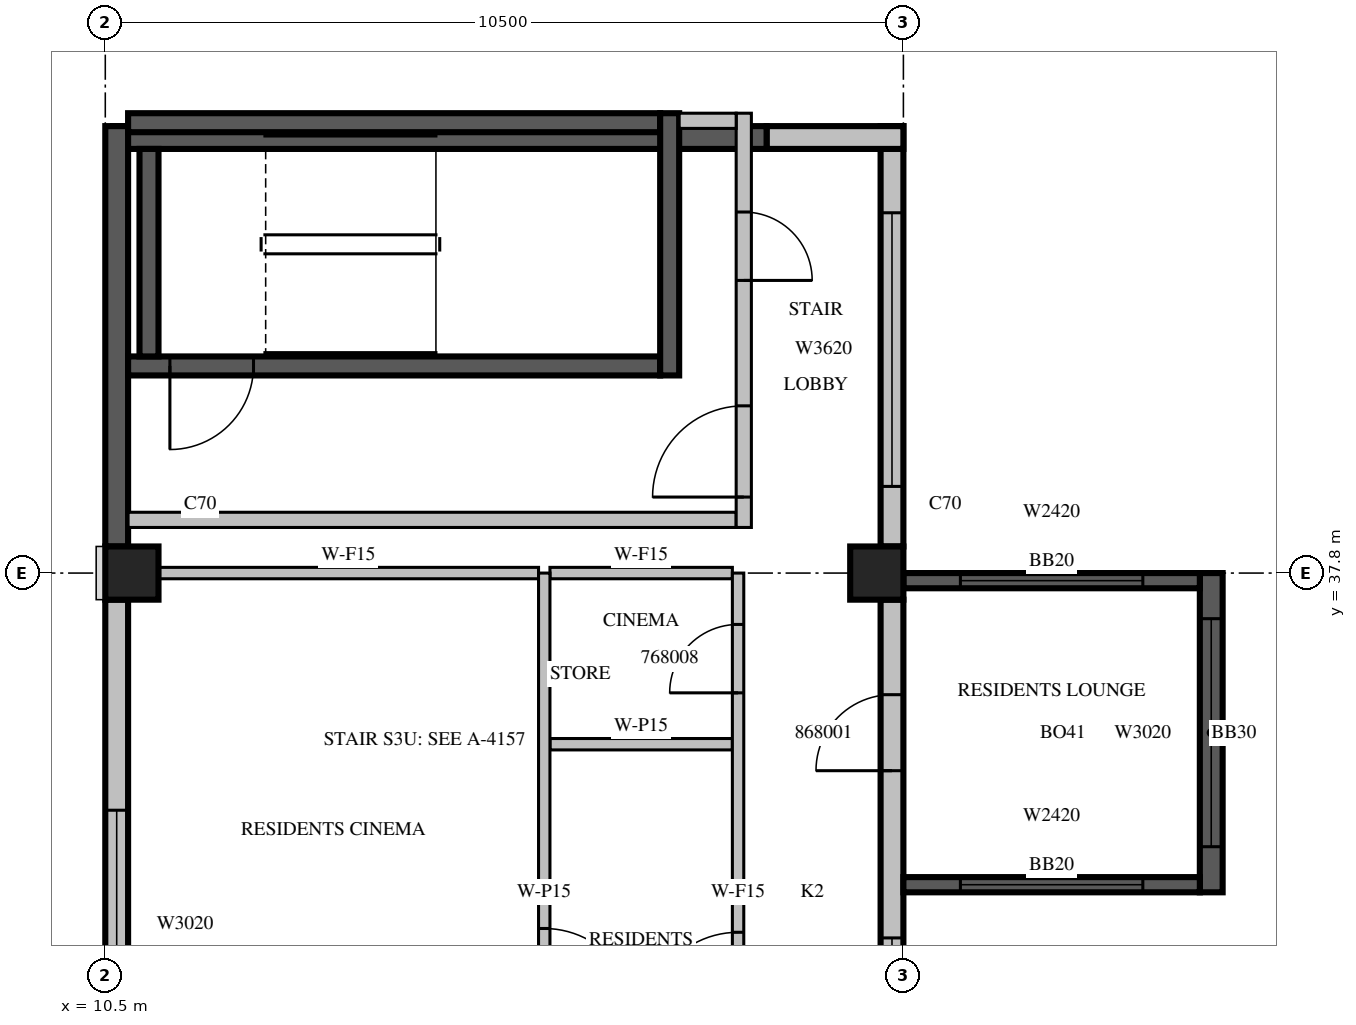
"""IFC4 building model, lengths in metres.
Left out: names, types, materials, properties, quantities, classifications, styles, units other than length and angle.
Written with IfcOpenShell. Run it as: python <this file> out.ifc"""

import sys

from ifc_helpers import new_model, si_unit, direction, frame, frame_2d, origin, origin_2d, place, context, subcontext, project, spatial, rectangle, extrude, source, transform, mapped, element, fill, save


model = new_model("IFC4")
c1 = context("Model", 3, precision=1e-05, world=origin(), true_north=direction((0.0, 1.0)))
c2 = subcontext(c1, "Body", "Model", "MODEL_VIEW")
j1 = project(units=[si_unit("LENGTHUNIT", "METRE"), si_unit("PLANEANGLEUNIT", "RADIAN")], contexts=[c1])
p1 = place(None, origin())
s1 = spatial("IfcSite", under=j1, at=p1, CompositionType="ELEMENT")
p2 = place(p1, origin())
s2 = spatial("IfcBuilding", under=s1, at=p2, CompositionType="ELEMENT")
p3 = place(p2, frame((0.0, 0.0, 298.5)))
s3 = spatial("IfcBuildingStorey", under=s2, at=p3, CompositionType="ELEMENT", Elevation=298.5)
m1 = source(origin(), c2, "Body", "SweptSolid", [
    extrude(rectangle(XDim=0.7, YDim=0.7, at=origin_2d()), origin(), (0.0, 0.0, 1.0), 3.5),
])
for number, where, z_axis, x_axis in (
    (1, (10.85, 37.8, 0.0), (0.0, 0.0, 1.0), (1.0, 0.0, 0.0)),
    (2, (20.65, 37.8, 0.0), (0.0, 0.0, 1.0), (1.0, 0.0, 0.0)),
):
    element("IfcColumn", number, at=place(p3, frame(where, z_axis=z_axis, x_axis=x_axis)), inside=s3, PredefinedType="COLUMN", context=c2, shape_type="MappedRepresentation", body=[
        mapped(m1, transform((0.0, 0.0, 0.0), scale=1.0)),
    ])
m2 = source(origin(), c2, "Body", "SweptSolid", [
    extrude(rectangle(XDim=7.7, YDim=0.3, at=frame_2d((3.85, 0.0))), origin(), (0.0, 0.0, 1.0), 3.1),
])
p4 = place(p3, frame((20.85, 29.75, 0.0), z_axis=(0.0, 0.0, 1.0), x_axis=(0.0, 1.0, 0.0)))
e3 = element("IfcWall", 3, at=p4, inside=s3, PredefinedType="STANDARD", context=c2, shape_type="MappedRepresentation", body=[
    mapped(m2, transform((0.0, 0.0, 0.0), scale=1.0)),
])
m3 = source(origin(), c2, "Body", "SweptSolid", [
    extrude(rectangle(XDim=3.0, YDim=2.0, at=frame_2d((1.5, 1.0))), frame((0.0, 0.16, 0.0), z_axis=(0.0, -1.0, 0.0), x_axis=(1.0, 0.0, 0.0)), (0.0, 0.0, 1.0), 0.32),
])
p5 = place(p4, frame((0.25, 0.0, 0.6)))
e4 = element("IfcOpeningElement", 4, at=p5, cuts=e3, PredefinedType="OPENING", context=c2, shape_type="MappedRepresentation", body=[
    mapped(m3, transform((0.0, 0.0, 0.0), scale=1.0)),
])
m4 = source(origin(), c2, "Body", "SweptSolid", [
    extrude(rectangle(XDim=1.0, YDim=2.1, at=frame_2d((0.5, 1.05))), frame((0.0, 0.16, 0.0), z_axis=(0.0, -1.0, 0.0), x_axis=(1.0, 0.0, 0.0)), (0.0, 0.0, 1.0), 0.32),
])
p6 = place(p4, frame((5.45, 0.0, 0.0)))
e5 = element("IfcOpeningElement", 5, at=p6, cuts=e3, PredefinedType="OPENING", context=c2, shape_type="MappedRepresentation", body=[
    mapped(m4, transform((0.0, 0.0, 0.0), scale=1.0)),
])
m5 = source(origin(), c2, "Body", "SweptSolid", [
    extrude(rectangle(XDim=5.53, YDim=0.3, at=frame_2d((2.765, 0.0))), origin(), (0.0, 0.0, 1.0), 3.1),
])
p7 = place(p3, frame((20.85, 38.15, 0.0), z_axis=(0.0, 0.0, 1.0), x_axis=(0.0, 1.0, 0.0)))
e6 = element("IfcWall", 6, at=p7, inside=s3, PredefinedType="STANDARD", context=c2, shape_type="MappedRepresentation", body=[
    mapped(m5, transform((0.0, 0.0, 0.0), scale=1.0)),
])
m6 = source(origin(), c2, "Body", "SweptSolid", [
    extrude(rectangle(XDim=3.6, YDim=2.0, at=frame_2d((1.8, 1.0))), frame((0.0, 0.16, 0.0), z_axis=(0.0, -1.0, 0.0), x_axis=(1.0, 0.0, 0.0)), (0.0, 0.0, 1.0), 0.32),
])
p8 = place(p7, frame((0.79, 0.0, 0.6)))
e7 = element("IfcOpeningElement", 7, at=p8, cuts=e6, PredefinedType="OPENING", context=c2, shape_type="MappedRepresentation", body=[
    mapped(m6, transform((0.0, 0.0, 0.0), scale=1.0)),
])
m7 = source(origin(), c2, "Body", "SweptSolid", [
    extrude(rectangle(XDim=1.8, YDim=0.3, at=frame_2d((0.9, 0.0))), origin(), (0.0, 0.0, 1.0), 3.1),
])
p9 = place(p3, frame((21.0, 43.53, 0.0), z_axis=(0.0, 0.0, 1.0), x_axis=(-1.0, 0.0, 0.0)))
e8 = element("IfcWall", 8, at=p9, inside=s3, PredefinedType="STANDARD", context=c2, shape_type="MappedRepresentation", body=[
    mapped(m7, transform((0.0, 0.0, 0.0), scale=1.0)),
])
m8 = source(origin(), c2, "Body", "SweptSolid", [
    extrude(rectangle(XDim=8.6, YDim=0.3, at=frame_2d((4.3, 0.0))), origin(), (0.0, 0.0, 1.0), 3.1),
])
p10 = place(p3, frame((19.2, 43.53, 0.0), z_axis=(0.0, 0.0, 1.0), x_axis=(-1.0, 0.0, 0.0)))
e9 = element("IfcWall", 9, at=p10, inside=s3, PredefinedType="SOLIDWALL", context=c2, shape_type="MappedRepresentation", body=[
    mapped(m8, transform((0.0, 0.0, 0.0), scale=1.0)),
])
m9 = source(origin(), c2, "Body", "SweptSolid", [
    extrude(rectangle(XDim=5.53, YDim=0.3, at=frame_2d((2.765, 0.0))), origin(), (0.0, 0.0, 1.0), 3.1),
])
p11 = place(p3, frame((10.65, 43.68, 0.0), z_axis=(0.0, 0.0, 1.0), x_axis=(0.0, -1.0, 0.0)))
e10 = element("IfcWall", 10, at=p11, inside=s3, PredefinedType="SOLIDWALL", context=c2, shape_type="MappedRepresentation", body=[
    mapped(m9, transform((0.0, 0.0, 0.0), scale=1.0)),
])
m10 = source(origin(), c2, "Body", "SweptSolid", [
    extrude(rectangle(XDim=6.37, YDim=0.3, at=frame_2d((3.185, 0.0))), origin(), (0.0, 0.0, 1.0), 3.1),
])
p12 = place(p3, frame((10.65, 37.45, 0.0), z_axis=(0.0, 0.0, 1.0), x_axis=(0.0, -1.0, 0.0)))
e11 = element("IfcWall", 11, at=p12, inside=s3, PredefinedType="STANDARD", context=c2, shape_type="MappedRepresentation", body=[
    mapped(m10, transform((0.0, 0.0, 0.0), scale=1.0)),
])
p13 = place(p12, frame((2.77, 0.0, 0.6)))
e12 = element("IfcOpeningElement", 12, at=p13, cuts=e11, PredefinedType="OPENING", context=c2, shape_type="MappedRepresentation", body=[
    mapped(m3, transform((0.0, 0.0, 0.0), scale=1.0)),
])
p14 = place(p3, frame((25.05, 33.6, 0.0), z_axis=(0.0, 0.0, 1.0), x_axis=(0.0, 1.0, 0.0)))
e13 = element("IfcWall", 13, at=p14, inside=s3, PredefinedType="SOLIDWALL", context=c2, shape_type="SweptSolid", body=[
    extrude(rectangle(XDim=4.2, YDim=0.3, at=frame_2d((2.1, 0.0))), origin(), (0.0, 0.0, 1.0), 3.09),
])
p15 = place(p14, frame((0.6, 0.0, 0.6)))
e14 = element("IfcOpeningElement", 14, at=p15, cuts=e13, PredefinedType="OPENING", context=c2, shape_type="MappedRepresentation", body=[
    mapped(m3, transform((0.0, 0.0, 0.0), scale=1.0)),
])
m11 = source(origin(), c2, "Body", "SweptSolid", [
    extrude(rectangle(XDim=3.9, YDim=0.2, at=frame_2d((1.95, 0.0))), origin(), (0.0, 0.0, 1.0), 3.09),
])
p16 = place(p3, frame((21.0, 33.7, 0.0), z_axis=(0.0, 0.0, 1.0), x_axis=(1.0, 0.0, 0.0)))
e15 = element("IfcWall", 15, at=p16, inside=s3, PredefinedType="SOLIDWALL", context=c2, shape_type="MappedRepresentation", body=[
    mapped(m11, transform((0.0, 0.0, 0.0), scale=1.0)),
])
m12 = source(origin(), c2, "Body", "SweptSolid", [
    extrude(rectangle(XDim=2.4, YDim=2.0, at=frame_2d((1.2, 1.0))), frame((0.0, 0.11, 0.0), z_axis=(0.0, -1.0, 0.0), x_axis=(1.0, 0.0, 0.0)), (0.0, 0.0, 1.0), 0.22),
])
p17 = place(p16, frame((0.75, 0.0, 0.6)))
e16 = element("IfcOpeningElement", 16, at=p17, cuts=e15, PredefinedType="OPENING", context=c2, shape_type="MappedRepresentation", body=[
    mapped(m12, transform((0.0, 0.0, 0.0), scale=1.0)),
])
p18 = place(p3, frame((21.0, 37.7, 0.0), z_axis=(0.0, 0.0, 1.0), x_axis=(1.0, 0.0, 0.0)))
e17 = element("IfcWall", 17, at=p18, inside=s3, PredefinedType="SOLIDWALL", context=c2, shape_type="MappedRepresentation", body=[
    mapped(m11, transform((0.0, 0.0, 0.0), scale=1.0)),
])
p19 = place(p18, frame((0.75, 0.0, 0.6)))
e18 = element("IfcOpeningElement", 18, at=p19, cuts=e17, PredefinedType="OPENING", context=c2, shape_type="MappedRepresentation", body=[
    mapped(m12, transform((0.0, 0.0, 0.0), scale=1.0)),
])
m13 = source(origin(), c2, "Body", "SweptSolid", [
    extrude(rectangle(XDim=7.0, YDim=0.25, at=frame_2d((3.5, 0.0))), origin(), (0.0, 0.0, 1.0), 3.1),
])
p20 = place(p3, frame((10.8, 40.525, 0.0), z_axis=(0.0, 0.0, 1.0), x_axis=(1.0, 0.0, 0.0)))
e19 = element("IfcWall", 19, at=p20, inside=s3, PredefinedType="SOLIDWALL", context=c2, shape_type="MappedRepresentation", body=[
    mapped(m13, transform((0.0, 0.0, 0.0), scale=1.0)),
])
m14 = source(origin(), c2, "Body", "SweptSolid", [
    extrude(rectangle(XDim=1.1, YDim=2.1, at=frame_2d((0.55, 1.05))), frame((0.0, 0.135, 0.0), z_axis=(0.0, -1.0, 0.0), x_axis=(1.0, 0.0, 0.0)), (0.0, 0.0, 1.0), 0.27),
])
p21 = place(p20, frame((0.55, 0.0, 0.0)))
e20 = element("IfcOpeningElement", 20, at=p21, cuts=e19, PredefinedType="OPENING", context=c2, shape_type="MappedRepresentation", body=[
    mapped(m14, transform((0.0, 0.0, 0.0), scale=1.0)),
])
p22 = place(p3, frame((10.8, 43.725, 0.0), z_axis=(0.0, 0.0, 1.0), x_axis=(1.0, 0.0, 0.0)))
e21 = element("IfcWall", 21, at=p22, inside=s3, PredefinedType="SOLIDWALL", context=c2, shape_type="MappedRepresentation", body=[
    mapped(m13, transform((0.0, 0.0, 0.0), scale=1.0)),
])
m15 = source(origin(), c2, "Body", "SweptSolid", [
    extrude(rectangle(XDim=3.45, YDim=0.25, at=frame_2d((1.725, 0.0))), origin(), (0.0, 0.0, 1.0), 3.1),
])
p23 = place(p3, frame((17.925, 40.4, 0.0), z_axis=(0.0, 0.0, 1.0), x_axis=(0.0, 1.0, 0.0)))
e22 = element("IfcWall", 22, at=p23, inside=s3, PredefinedType="SOLIDWALL", context=c2, shape_type="MappedRepresentation", body=[
    mapped(m15, transform((0.0, 0.0, 0.0), scale=1.0)),
])
m16 = source(origin(), c2, "Body", "SweptSolid", [
    extrude(rectangle(XDim=2.73, YDim=0.25, at=frame_2d((1.365, 0.0))), origin(), (0.0, 0.0, 1.0), 3.1),
])
p24 = place(p3, frame((11.075, 40.65, 0.0), z_axis=(0.0, 0.0, 1.0), x_axis=(0.0, 1.0, 0.0)))
e23 = element("IfcWall", 23, at=p24, inside=s3, PredefinedType="SOLIDWALL", context=c2, shape_type="MappedRepresentation", body=[
    mapped(m16, transform((0.0, 0.0, 0.0), scale=1.0)),
])
m17 = source(origin(), c2, "Body", "SweptSolid", [
    extrude(rectangle(XDim=8.0, YDim=0.2, at=frame_2d((4.0, 0.0))), origin(), (0.0, 0.0, 1.0), 3.1),
])
p25 = place(p3, frame((10.8, 38.5, 0.0), z_axis=(0.0, 0.0, 1.0), x_axis=(1.0, 0.0, 0.0)))
e24 = element("IfcWall", 24, at=p25, inside=s3, PredefinedType="PARTITIONING", context=c2, shape_type="MappedRepresentation", body=[
    mapped(m17, transform((0.0, 0.0, 0.0), scale=1.0)),
])
m18 = source(origin(), c2, "Body", "SweptSolid", [
    extrude(rectangle(XDim=5.45, YDim=0.2, at=frame_2d((2.725, 0.0))), origin(), (0.0, 0.0, 1.0), 3.1),
])
p26 = place(p3, frame((18.9, 38.4, 0.0), z_axis=(0.0, 0.0, 1.0), x_axis=(0.0, 1.0, 0.0)))
e25 = element("IfcWall", 25, at=p26, inside=s3, PredefinedType="PARTITIONING", context=c2, shape_type="MappedRepresentation", body=[
    mapped(m18, transform((0.0, 0.0, 0.0), scale=1.0)),
])
m19 = source(origin(), c2, "Body", "SweptSolid", [
    extrude(rectangle(XDim=1.2, YDim=2.1, at=frame_2d((0.6, 1.05))), frame((0.0, 0.11, 0.0), z_axis=(0.0, -1.0, 0.0), x_axis=(1.0, 0.0, 0.0)), (0.0, 0.0, 1.0), 0.22),
])
p27 = place(p26, frame((0.4, 0.0, 0.0)))
e26 = element("IfcOpeningElement", 26, at=p27, cuts=e25, PredefinedType="OPENING", context=c2, shape_type="MappedRepresentation", body=[
    mapped(m19, transform((0.0, 0.0, 0.0), scale=1.0)),
])
m20 = source(origin(), c2, "Body", "SweptSolid", [
    extrude(rectangle(XDim=0.9, YDim=2.1, at=frame_2d((0.45, 1.05))), frame((0.0, 0.11, 0.0), z_axis=(0.0, -1.0, 0.0), x_axis=(1.0, 0.0, 0.0)), (0.0, 0.0, 1.0), 0.22),
])
p28 = place(p26, frame((3.25, 0.0, 0.0)))
e27 = element("IfcOpeningElement", 27, at=p28, cuts=e25, PredefinedType="OPENING", context=c2, shape_type="MappedRepresentation", body=[
    mapped(m20, transform((0.0, 0.0, 0.0), scale=1.0)),
])
m21 = source(origin(), c2, "Body", "SweptSolid", [
    extrude(rectangle(XDim=0.75, YDim=0.2, at=frame_2d((0.375, 0.0))), origin(), (0.0, 0.0, 1.0), 3.1),
])
p29 = place(p3, frame((18.05, 43.75, 0.0), z_axis=(0.0, 0.0, 1.0), x_axis=(1.0, 0.0, 0.0)))
e28 = element("IfcWall", 28, at=p29, inside=s3, PredefinedType="PARTITIONING", context=c2, shape_type="MappedRepresentation", body=[
    mapped(m21, transform((0.0, 0.0, 0.0), scale=1.0)),
])
m22 = source(origin(), c2, "Body", "SweptSolid", [
    extrude(rectangle(XDim=2.4, YDim=0.15, at=frame_2d((1.2, 0.0))), origin(), (0.0, 0.0, 1.0), 3.1),
])
p30 = place(p3, frame((18.75, 35.548, 0.0), z_axis=(0.0, 0.0, 1.0), x_axis=(-1.0, 0.0, 0.0)))
e29 = element("IfcWall", 29, at=p30, inside=s3, PredefinedType="PARTITIONING", context=c2, shape_type="MappedRepresentation", body=[
    mapped(m22, transform((0.0, 0.0, 0.0), scale=1.0)),
])
m23 = source(origin(), c2, "Body", "SweptSolid", [
    extrude(rectangle(XDim=5.001, YDim=0.15, at=frame_2d((2.501, 0.0))), origin(), (0.0, 0.0, 1.0), 3.1),
])
p31 = place(p3, frame((16.2, 37.8, 0.0), z_axis=(0.0, 0.0, 1.0), x_axis=(-1.0, 0.0, 0.0)))
e30 = element("IfcWall", 30, at=p31, inside=s3, PredefinedType="PARTITIONING", context=c2, shape_type="MappedRepresentation", body=[
    mapped(m23, transform((0.0, 0.0, 0.0), scale=1.0)),
])
p32 = place(p3, frame((18.75, 37.8, 0.0), z_axis=(0.0, 0.0, 1.0), x_axis=(-1.0, 0.0, 0.0)))
e31 = element("IfcWall", 31, at=p32, inside=s3, PredefinedType="PARTITIONING", context=c2, shape_type="MappedRepresentation", body=[
    mapped(m22, transform((0.0, 0.0, 0.0), scale=1.0)),
])
m24 = source(origin(), c2, "Body", "SweptSolid", [
    extrude(rectangle(XDim=8.4, YDim=0.15, at=frame_2d((4.2, 0.0))), origin(), (0.0, 0.0, 1.0), 3.1),
])
p33 = place(p3, frame((16.275, 29.4, 0.0), z_axis=(0.0, 0.0, 1.0), x_axis=(0.0, 1.0, 0.0)))
e32 = element("IfcWall", 32, at=p33, inside=s3, PredefinedType="PARTITIONING", context=c2, shape_type="MappedRepresentation", body=[
    mapped(m24, transform((0.0, 0.0, 0.0), scale=1.0)),
])
m25 = source(origin(), c2, "Body", "SweptSolid", [
    extrude(rectangle(XDim=1.2, YDim=2.1, at=frame_2d((0.6, 1.05))), frame((0.0, 0.085, 0.0), z_axis=(0.0, -1.0, 0.0), x_axis=(1.0, 0.0, 0.0)), (0.0, 0.0, 1.0), 0.17),
])
p34 = place(p33, frame((2.524, 0.0, 0.0)))
e33 = element("IfcOpeningElement", 33, at=p34, cuts=e32, PredefinedType="OPENING", context=c2, shape_type="MappedRepresentation", body=[
    mapped(m25, transform((0.0, 0.0, 0.0), scale=1.0)),
])
p35 = place(p3, frame((18.825, 29.4, 0.0), z_axis=(0.0, 0.0, 1.0), x_axis=(0.0, 1.0, 0.0)))
e34 = element("IfcWall", 34, at=p35, inside=s3, PredefinedType="PARTITIONING", context=c2, shape_type="MappedRepresentation", body=[
    mapped(m24, transform((0.0, 0.0, 0.0), scale=1.0)),
])
p36 = place(p35, frame((2.474, 0.0, 0.0)))
e35 = element("IfcOpeningElement", 35, at=p36, cuts=e34, PredefinedType="OPENING", context=c2, shape_type="MappedRepresentation", body=[
    mapped(m25, transform((0.0, 0.0, 0.0), scale=1.0)),
])
m26 = source(origin(), c2, "Body", "SweptSolid", [
    extrude(rectangle(XDim=0.9, YDim=2.1, at=frame_2d((0.45, 1.05))), frame((0.0, 0.085, 0.0), z_axis=(0.0, -1.0, 0.0), x_axis=(1.0, 0.0, 0.0)), (0.0, 0.0, 1.0), 0.17),
])
p37 = place(p35, frame((6.824, 0.0, 0.0)))
e36 = element("IfcOpeningElement", 36, at=p37, cuts=e34, PredefinedType="OPENING", context=c2, shape_type="MappedRepresentation", body=[
    mapped(m26, transform((0.0, 0.0, 0.0), scale=1.0)),
])
m27 = source(origin(), c2, "Body", "SweptSolid", [
    extrude(rectangle(XDim=3.0, YDim=2.0, at=frame_2d((1.5, 1.0))), frame((0.0, 0.03, 0.0), z_axis=(0.0, -1.0, 0.0), x_axis=(1.0, 0.0, 0.0)), (0.0, 0.0, 1.0), 0.06),
])
p38 = place(p5, origin())
e37 = element("IfcWindow", 37, at=p38, inside=s3, PartitioningType="SINGLE_PANEL", PredefinedType="WINDOW", context=c2, shape_type="MappedRepresentation", body=[
    mapped(m27, transform((0.0, 0.0, 0.0), scale=1.0)),
])
fill(e4, e37)
m28 = source(origin(), c2, "Body", "SweptSolid", [
    extrude(rectangle(XDim=3.6, YDim=2.0, at=frame_2d((1.8, 1.0))), frame((0.0, 0.03, 0.0), z_axis=(0.0, -1.0, 0.0), x_axis=(1.0, 0.0, 0.0)), (0.0, 0.0, 1.0), 0.06),
])
p39 = place(p8, origin())
e38 = element("IfcWindow", 38, at=p39, inside=s3, PartitioningType="SINGLE_PANEL", PredefinedType="WINDOW", context=c2, shape_type="MappedRepresentation", body=[
    mapped(m28, transform((0.0, 0.0, 0.0), scale=1.0)),
])
fill(e7, e38)
p40 = place(p13, origin())
e39 = element("IfcWindow", 39, at=p40, inside=s3, PartitioningType="SINGLE_PANEL", PredefinedType="WINDOW", context=c2, shape_type="MappedRepresentation", body=[
    mapped(m27, transform((0.0, 0.0, 0.0), scale=1.0)),
])
fill(e12, e39)
p41 = place(p15, origin())
e40 = element("IfcWindow", 40, at=p41, inside=s3, PartitioningType="SINGLE_PANEL", PredefinedType="WINDOW", context=c2, shape_type="MappedRepresentation", body=[
    mapped(m27, transform((0.0, 0.0, 0.0), scale=1.0)),
])
fill(e14, e40)
m29 = source(origin(), c2, "Body", "SweptSolid", [
    extrude(rectangle(XDim=2.4, YDim=2.0, at=frame_2d((1.2, 1.0))), frame((0.0, 0.03, 0.0), z_axis=(0.0, -1.0, 0.0), x_axis=(1.0, 0.0, 0.0)), (0.0, 0.0, 1.0), 0.06),
])
p42 = place(p17, origin())
e41 = element("IfcWindow", 41, at=p42, inside=s3, PartitioningType="SINGLE_PANEL", PredefinedType="WINDOW", context=c2, shape_type="MappedRepresentation", body=[
    mapped(m29, transform((0.0, 0.0, 0.0), scale=1.0)),
])
fill(e16, e41)
p43 = place(p19, origin())
e42 = element("IfcWindow", 42, at=p43, inside=s3, PartitioningType="SINGLE_PANEL", PredefinedType="WINDOW", context=c2, shape_type="MappedRepresentation", body=[
    mapped(m29, transform((0.0, 0.0, 0.0), scale=1.0)),
])
fill(e18, e42)
m30 = source(origin(), c2, "Body", "SweptSolid", [
    extrude(rectangle(XDim=1.1, YDim=2.1, at=frame_2d((0.55, 1.05))), frame((0.0, 0.025, 0.0), z_axis=(0.0, -1.0, 0.0), x_axis=(1.0, 0.0, 0.0)), (0.0, 0.0, 1.0), 0.05),
])
p44 = place(p21, origin())
e43 = element("IfcDoor", 43, at=p44, inside=s3, OperationType="SINGLE_SWING_RIGHT", PredefinedType="DOOR", context=c2, shape_type="MappedRepresentation", body=[
    mapped(m30, transform((0.0, 0.0, 0.0), scale=1.0)),
])
fill(e20, e43)
m31 = source(origin(), c2, "Body", "SweptSolid", [
    extrude(rectangle(XDim=1.2, YDim=2.1, at=frame_2d((0.6, 1.05))), frame((0.0, 0.025, 0.0), z_axis=(0.0, -1.0, 0.0), x_axis=(1.0, 0.0, 0.0)), (0.0, 0.0, 1.0), 0.05),
])
p45 = place(p27, origin())
e44 = element("IfcDoor", 44, at=p45, inside=s3, OperationType="SINGLE_SWING_LEFT", PredefinedType="DOOR", context=c2, shape_type="MappedRepresentation", body=[
    mapped(m31, transform((0.0, 0.0, 0.0), scale=1.0)),
])
fill(e26, e44)
m32 = source(origin(), c2, "Body", "SweptSolid", [
    extrude(rectangle(XDim=0.9, YDim=2.1, at=frame_2d((0.45, 1.05))), frame((0.0, 0.025, 0.0), z_axis=(0.0, -1.0, 0.0), x_axis=(1.0, 0.0, 0.0)), (0.0, 0.0, 1.0), 0.05),
])
p46 = place(p28, origin())
e45 = element("IfcDoor", 45, at=p46, inside=s3, OperationType="SINGLE_SWING_RIGHT", PredefinedType="DOOR", context=c2, shape_type="MappedRepresentation", body=[
    mapped(m32, transform((0.0, 0.0, 0.0), scale=1.0)),
])
fill(e27, e45)
p47 = place(p36, origin())
e46 = element("IfcDoor", 46, at=p47, inside=s3, OperationType="SINGLE_SWING_LEFT", PredefinedType="DOOR", context=c2, shape_type="MappedRepresentation", body=[
    mapped(m31, transform((0.0, 0.0, 0.0), scale=1.0)),
])
fill(e35, e46)
p48 = place(p34, origin())
e47 = element("IfcDoor", 47, at=p48, inside=s3, OperationType="SINGLE_SWING_RIGHT", PredefinedType="DOOR", context=c2, shape_type="MappedRepresentation", body=[
    mapped(m31, transform((0.0, 0.0, 0.0), scale=1.0)),
])
fill(e33, e47)
p49 = place(p37, origin())
e48 = element("IfcDoor", 48, at=p49, inside=s3, OperationType="SINGLE_SWING_LEFT", PredefinedType="DOOR", context=c2, shape_type="MappedRepresentation", body=[
    mapped(m32, transform((0.0, 0.0, 0.0), scale=1.0)),
])
fill(e36, e48)
m33 = source(origin(), c2, "Body", "SweptSolid", [
    extrude(rectangle(XDim=1.0, YDim=2.1, at=frame_2d((0.5, 1.05))), frame((0.0, 0.025, 0.0), z_axis=(0.0, -1.0, 0.0), x_axis=(1.0, 0.0, 0.0)), (0.0, 0.0, 1.0), 0.05),
])
p50 = place(p6, origin())
e49 = element("IfcDoor", 49, at=p50, inside=s3, OperationType="SINGLE_SWING_LEFT", PredefinedType="DOOR", context=c2, shape_type="MappedRepresentation", body=[
    mapped(m33, transform((0.0, 0.0, 0.0), scale=1.0)),
])
fill(e5, e49)
save(model, sys.argv[1])
